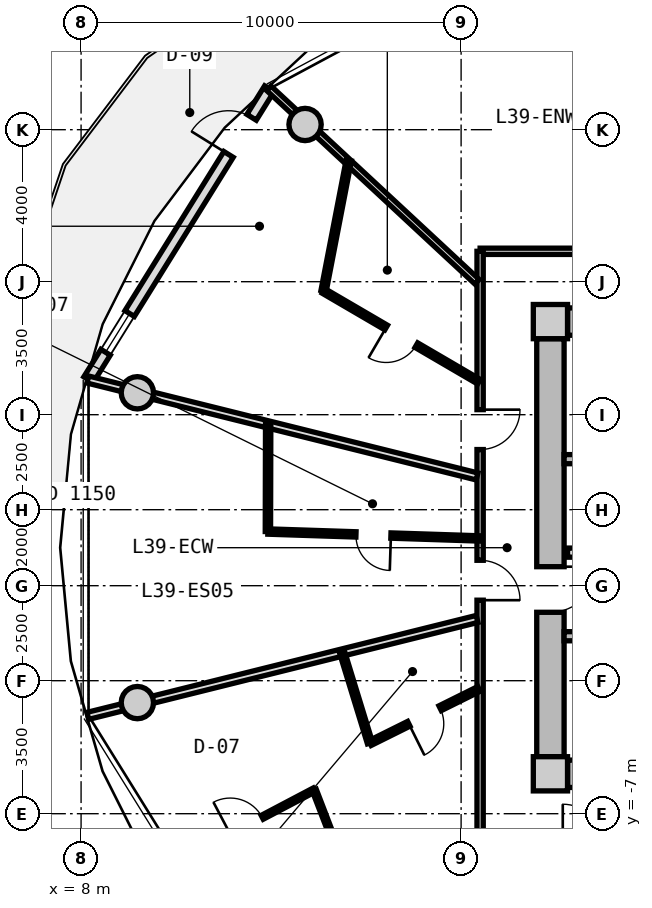
"""IFC4 building model, lengths in metres.
Left out: names, types, materials, properties, quantities, classifications, styles, units other than length and angle.
Written with IfcOpenShell. Run it as: python <this file> out.ifc"""

import sys

from ifc_helpers import new_model, si_unit, direction, frame, frame_2d, origin, origin_2d, place, context, subcontext, project, spatial, rectangle, circle, extrude, source, transform, mapped, element, fill, save


model = new_model("IFC4")
c1 = context("Model", 3, precision=1e-05, world=origin(), true_north=direction((0.0, 1.0)))
c2 = subcontext(c1, "Body", "Model", "MODEL_VIEW")
j1 = project(units=[si_unit("LENGTHUNIT", "METRE"), si_unit("PLANEANGLEUNIT", "RADIAN")], contexts=[c1])
p1 = place(None, origin())
s1 = spatial("IfcSite", under=j1, at=p1, CompositionType="ELEMENT")
p2 = place(p1, origin())
s2 = spatial("IfcBuilding", under=s1, at=p2, CompositionType="ELEMENT")
p3 = place(p2, frame((0.0, 0.0, 126.75)))
s3 = spatial("IfcBuildingStorey", under=s2, at=p3, CompositionType="ELEMENT", Elevation=126.75)
m1 = source(origin(), c2, "Body", "SweptSolid", [
    extrude(rectangle(XDim=0.9, YDim=0.9, at=origin_2d()), origin(), (0.0, 0.0, 1.0), 3.05),
])
for number, where, z_axis, x_axis in (
    (1, (20.35, -5.95, 0.0), (0.0, 0.0, 1.0), (1.0, 0.0, 0.0)),
    (2, (20.35, 5.95, 0.0), (0.0, 0.0, 1.0), (1.0, 0.0, 0.0)),
):
    element("IfcColumn", number, at=place(p3, frame(where, z_axis=z_axis, x_axis=x_axis)), inside=s3, PredefinedType="COLUMN", context=c2, shape_type="MappedRepresentation", body=[
        mapped(m1, transform((0.0, 0.0, 0.0), x_axis=(1.0, 0.0, 0.0), y_axis=(0.0, 1.0, 0.0), z_axis=(0.0, 0.0, 1.0), scale=1.0)),
    ])
m2 = source(origin(), c2, "Body", "SweptSolid", [
    extrude(rectangle(XDim=14.4, YDim=0.72, at=frame_2d((7.2, 0.0))), origin(), (0.0, 0.0, 1.0), 2.73),
])
for number, where, z_axis, x_axis in (
    (3, (20.8, 5.95, 0.0), (0.0, 0.0, 1.0), (1.0, 0.0, 0.0)),
    (4, (35.2, -5.95, 0.0), (0.0, 0.0, 1.0), (-1.0, 0.0, 0.0)),
):
    element("IfcWall", number, at=place(p3, frame(where, z_axis=z_axis, x_axis=x_axis)), inside=s3, PredefinedType="SHEAR", context=c2, shape_type="MappedRepresentation", body=[
        mapped(m2, transform((0.0, 0.0, 0.0), x_axis=(1.0, 0.0, 0.0), y_axis=(0.0, 1.0, 0.0), z_axis=(0.0, 0.0, 1.0), scale=1.0)),
    ])
m3 = source(origin(), c2, "Body", "SweptSolid", [
    extrude(rectangle(XDim=11.0, YDim=0.72, at=frame_2d((5.5, 0.0))), origin(), (0.0, 0.0, 1.0), 2.73),
])
p4 = place(p3, frame((20.35, -5.5, 0.0), z_axis=(0.0, 0.0, 1.0), x_axis=(0.0, 1.0, 0.0)))
e5 = element("IfcWall", 5, at=p4, inside=s3, PredefinedType="SHEAR", context=c2, shape_type="MappedRepresentation", body=[
    mapped(m3, transform((0.0, 0.0, 0.0), x_axis=(1.0, 0.0, 0.0), y_axis=(0.0, 1.0, 0.0), z_axis=(0.0, 0.0, 1.0), scale=1.0)),
])
p5 = place(p4, frame((3.8, 0.0, 0.0)))
e6 = element("IfcOpeningElement", 6, at=p5, cuts=e5, PredefinedType="OPENING", context=c2, shape_type="SweptSolid", body=[
    extrude(rectangle(XDim=1.2, YDim=2.15, at=frame_2d((0.6, 1.075))), frame((0.0, 0.37, 0.0), z_axis=(0.0, -1.0, 0.0), x_axis=(1.0, 0.0, 0.0)), (0.0, 0.0, 1.0), 0.74),
])
m4 = source(origin(), c2, "Body", "SweptSolid", [
    extrude(circle(Radius=0.425, at=origin_2d()), origin(), (0.0, 0.0, 1.0), 3.05),
])
for number, where, z_axis, x_axis in (
    (7, (13.894, 11.137, 0.0), (0.0, 0.0, 1.0), (1.0, 0.0, 0.0)),
    (8, (9.481, 4.076, 0.0), (0.0, 0.0, 1.0), (1.0, 0.0, 0.0)),
    (9, (9.481, -4.076, 0.0), (0.0, 0.0, 1.0), (1.0, 0.0, 0.0)),
):
    element("IfcColumn", number, at=place(p3, frame(where, z_axis=z_axis, x_axis=x_axis)), inside=s3, PredefinedType="COLUMN", context=c2, shape_type="MappedRepresentation", body=[
        mapped(m4, transform((0.0, 0.0, 0.0), x_axis=(1.0, 0.0, 0.0), y_axis=(0.0, 1.0, 0.0), z_axis=(0.0, 0.0, 1.0), scale=1.0)),
    ])
m5 = source(origin(), c2, "Body", "SweptSolid", [
    extrude(rectangle(XDim=9.014, YDim=0.29, at=frame_2d((4.507, 0.0))), origin(), (0.0, 0.0, 1.0), 2.73),
])
p6 = place(p3, frame((8.196, 4.421, 0.0), z_axis=(0.0, 0.0, 1.0), x_axis=(0.527732945084, 0.849410347637, 0.0)))
e10 = element("IfcWall", 10, at=p6, inside=s3, PredefinedType="SOLIDWALL", context=c2, shape_type="MappedRepresentation", body=[
    mapped(m5, transform((0.0, 0.0, 0.0), x_axis=(1.0, 0.0, 0.0), y_axis=(0.0, 1.0, 0.0), z_axis=(0.0, 0.0, 1.0), scale=1.0)),
])
p7 = place(p6, frame((6.98, 0.0, 0.0)))
e11 = element("IfcOpeningElement", 11, at=p7, cuts=e10, PredefinedType="OPENING", context=c2, shape_type="SweptSolid", body=[
    extrude(rectangle(XDim=1.15, YDim=2.25, at=frame_2d((0.575, 1.125))), frame((0.0, 0.155, 0.0), z_axis=(0.0, -1.0, 0.0), x_axis=(1.0, 0.0, 0.0)), (0.0, 0.0, 1.0), 0.31),
])
p8 = place(p6, frame((0.85, 0.0, 0.85)))
e12 = element("IfcOpeningElement", 12, at=p8, cuts=e10, PredefinedType="OPENING", context=c2, shape_type="SweptSolid", body=[
    extrude(rectangle(XDim=1.2, YDim=1.5, at=frame_2d((0.6, 0.75))), frame((0.0, 0.155, 0.0), z_axis=(0.0, -1.0, 0.0), x_axis=(1.0, 0.0, 0.0)), (0.0, 0.0, 1.0), 0.31),
])
m6 = source(origin(), c2, "Body", "SweptSolid", [
    extrude(rectangle(XDim=7.83, YDim=0.24, at=frame_2d((3.915, 0.0))), origin(), (0.0, 0.0, 1.0), 2.73),
])
p9 = place(p3, frame((20.71, 2.33, 0.0), z_axis=(0.0, 0.0, 1.0), x_axis=(1.0, 0.0, 0.0)))
e13 = element("IfcWall", 13, at=p9, inside=s3, PredefinedType="PARTITIONING", context=c2, shape_type="MappedRepresentation", body=[
    mapped(m6, transform((0.0, 0.0, 0.0), x_axis=(1.0, 0.0, 0.0), y_axis=(0.0, 1.0, 0.0), z_axis=(0.0, 0.0, 1.0), scale=1.0)),
])
p10 = place(p3, frame((20.71, -2.33, 0.0), z_axis=(0.0, 0.0, 1.0), x_axis=(1.0, 0.0, 0.0)))
e14 = element("IfcWall", 14, at=p10, inside=s3, PredefinedType="PARTITIONING", context=c2, shape_type="MappedRepresentation", body=[
    mapped(m6, transform((0.0, 0.0, 0.0), x_axis=(1.0, 0.0, 0.0), y_axis=(0.0, 1.0, 0.0), z_axis=(0.0, 0.0, 1.0), scale=1.0)),
])
p11 = place(p10, frame((0.95, 0.0, 0.0)))
e15 = element("IfcOpeningElement", 15, at=p11, cuts=e14, PredefinedType="OPENING", context=c2, shape_type="SweptSolid", body=[
    extrude(rectangle(XDim=1.1, YDim=2.15, at=frame_2d((0.55, 1.075))), frame((0.0, 0.13, 0.0), z_axis=(0.0, -1.0, 0.0), x_axis=(1.0, 0.0, 0.0)), (0.0, 0.0, 1.0), 0.26),
])
m7 = source(origin(), c2, "Body", "SweptSolid", [
    extrude(rectangle(XDim=7.62, YDim=0.24, at=frame_2d((3.81, 0.0))), origin(), (0.0, 0.0, 1.0), 2.715),
])
p12 = place(p3, frame((20.8, -0.13, 0.0), z_axis=(0.0, 0.0, 1.0), x_axis=(1.0, 0.0, 0.0)))
e16 = element("IfcWall", 16, at=p12, inside=s3, PredefinedType="PARTITIONING", context=c2, shape_type="MappedRepresentation", body=[
    mapped(m7, transform((0.0, 0.0, 0.0), x_axis=(1.0, 0.0, 0.0), y_axis=(0.0, 1.0, 0.0), z_axis=(0.0, 0.0, 1.0), scale=1.0)),
])
p13 = place(p12, frame((6.22, 0.0, 0.0)))
e17 = element("IfcOpeningElement", 17, at=p13, cuts=e16, PredefinedType="OPENING", context=c2, shape_type="SweptSolid", body=[
    extrude(rectangle(XDim=1.0, YDim=2.1, at=frame_2d((0.5, 1.05))), frame((0.0, 0.13, 0.0), z_axis=(0.0, -1.0, 0.0), x_axis=(1.0, 0.0, 0.0)), (0.0, 0.0, 1.0), 0.26),
])
p14 = place(p12, frame((2.4, 0.0, 0.0)))
e18 = element("IfcOpeningElement", 18, at=p14, cuts=e16, PredefinedType="OPENING", context=c2, shape_type="SweptSolid", body=[
    extrude(rectangle(XDim=1.0, YDim=2.1, at=frame_2d((0.5, 1.05))), frame((0.0, 0.13, 0.0), z_axis=(0.0, -1.0, 0.0), x_axis=(1.0, 0.0, 0.0)), (0.0, 0.0, 1.0), 0.26),
])
m8 = source(origin(), c2, "Body", "SweptSolid", [
    extrude(rectangle(XDim=8.6, YDim=0.165, at=frame_2d((4.3, 0.0))), origin(), (0.0, 0.0, 1.0), 2.715),
])
p15 = place(p3, frame((18.5, 7.8, 0.0), z_axis=(0.0, 0.0, 1.0), x_axis=(1.0, 0.0, 0.0)))
e19 = element("IfcWall", 19, at=p15, inside=s3, PredefinedType="PARTITIONING", context=c2, shape_type="MappedRepresentation", body=[
    mapped(m8, transform((0.0, 0.0, 0.0), x_axis=(1.0, 0.0, 0.0), y_axis=(0.0, 1.0, 0.0), z_axis=(0.0, 0.0, 1.0), scale=1.0)),
])
p16 = place(p15, frame((3.509, 0.0, 0.0)))
e20 = element("IfcOpeningElement", 20, at=p16, cuts=e19, PredefinedType="OPENING", context=c2, shape_type="SweptSolid", body=[
    extrude(rectangle(XDim=1.05, YDim=2.15, at=frame_2d((0.525, 1.075))), frame((0.0, 0.093, 0.0), z_axis=(0.0, -1.0, 0.0), x_axis=(1.0, 0.0, 0.0)), (0.0, 0.0, 1.0), 0.185),
])
m9 = source(origin(), c2, "Body", "SweptSolid", [
    extrude(rectangle(XDim=15.6, YDim=0.165, at=frame_2d((7.8, 0.0))), origin(), (0.0, 0.0, 1.0), 2.715),
])
p17 = place(p3, frame((18.5, -7.8, 0.0), z_axis=(0.0, 0.0, 1.0), x_axis=(0.0, 1.0, 0.0)))
e21 = element("IfcWall", 21, at=p17, inside=s3, PredefinedType="PARTITIONING", context=c2, shape_type="MappedRepresentation", body=[
    mapped(m9, transform((0.0, 0.0, 0.0), x_axis=(1.0, 0.0, 0.0), y_axis=(0.0, 1.0, 0.0), z_axis=(0.0, 0.0, 1.0), scale=1.0)),
])
p18 = place(p17, frame((10.383, 0.0, 0.0)))
e22 = element("IfcOpeningElement", 22, at=p18, cuts=e21, PredefinedType="OPENING", context=c2, shape_type="SweptSolid", body=[
    extrude(rectangle(XDim=1.05, YDim=2.15, at=frame_2d((0.525, 1.075))), frame((0.0, 0.093, 0.0), z_axis=(0.0, -1.0, 0.0), x_axis=(1.0, 0.0, 0.0)), (0.0, 0.0, 1.0), 0.185),
])
p19 = place(p17, frame((6.419, 0.0, 0.0)))
e23 = element("IfcOpeningElement", 23, at=p19, cuts=e21, PredefinedType="OPENING", context=c2, shape_type="SweptSolid", body=[
    extrude(rectangle(XDim=1.05, YDim=2.15, at=frame_2d((0.525, 1.075))), frame((0.0, 0.093, 0.0), z_axis=(0.0, -1.0, 0.0), x_axis=(1.0, 0.0, 0.0)), (0.0, 0.0, 1.0), 0.185),
])
m10 = source(origin(), c2, "Body", "SweptSolid", [
    extrude(rectangle(XDim=7.482, YDim=0.165, at=frame_2d((3.741, 0.0))), origin(), (0.0, 0.0, 1.0), 2.215),
])
p20 = place(p3, frame((18.42, 6.998, 0.0), z_axis=(0.0, 0.0, 1.0), x_axis=(-0.732508698043, 0.680757671489, 0.0)))
e24 = element("IfcWall", 24, at=p20, inside=s3, PredefinedType="PARTITIONING", context=c2, shape_type="MappedRepresentation", body=[
    mapped(m10, transform((0.0, 0.0, 0.0), x_axis=(1.0, 0.0, 0.0), y_axis=(0.0, 1.0, 0.0), z_axis=(0.0, 0.0, 1.0), scale=1.0)),
])
m11 = source(origin(), c2, "Body", "SweptSolid", [
    extrude(rectangle(XDim=10.556, YDim=0.19, at=frame_2d((5.278, 0.0))), origin(), (0.0, 0.0, 1.0), 2.215),
])
p21 = place(p3, frame((18.42, 1.875, 0.0), z_axis=(0.0, 0.0, 1.0), x_axis=(-0.970363857851, 0.241648470667, 0.0)))
e25 = element("IfcWall", 25, at=p21, inside=s3, PredefinedType="PARTITIONING", context=c2, shape_type="MappedRepresentation", body=[
    mapped(m11, transform((0.0, 0.0, 0.0), x_axis=(1.0, 0.0, 0.0), y_axis=(0.0, 1.0, 0.0), z_axis=(0.0, 0.0, 1.0), scale=1.0)),
])
m12 = source(origin(), c2, "Body", "SweptSolid", [
    extrude(rectangle(XDim=4.735, YDim=0.14, at=frame_2d((2.368, 0.0))), origin(), (0.0, 0.0, 1.0), 2.715),
])
p22 = place(p3, frame((18.47, 4.368, 0.0), z_axis=(0.0, 0.0, 1.0), x_axis=(-0.863537576642, 0.504284496814, 0.0)))
e26 = element("IfcWall", 26, at=p22, inside=s3, PredefinedType="PARTITIONING", context=c2, shape_type="MappedRepresentation", body=[
    mapped(m12, transform((0.0, 0.0, 0.0), x_axis=(1.0, 0.0, 0.0), y_axis=(0.0, 1.0, 0.0), z_axis=(0.0, 0.0, 1.0), scale=1.0)),
])
p23 = place(p22, frame((1.908, 0.0, 0.0)))
e27 = element("IfcOpeningElement", 27, at=p23, cuts=e26, PredefinedType="OPENING", context=c2, shape_type="SweptSolid", body=[
    extrude(rectangle(XDim=0.92, YDim=2.1, at=frame_2d((0.46, 1.05))), frame((0.0, 0.08, 0.0), z_axis=(0.0, -1.0, 0.0), x_axis=(1.0, 0.0, 0.0)), (0.0, 0.0, 1.0), 0.16),
])
m13 = source(origin(), c2, "Body", "SweptSolid", [
    extrude(rectangle(XDim=3.499, YDim=0.14, at=frame_2d((1.75, 0.0))), origin(), (0.0, 0.0, 1.0), 2.715),
])
p24 = place(p3, frame((14.381, 6.756, 0.0), z_axis=(0.0, 0.0, 1.0), x_axis=(0.18957713629, 0.981865830649, 0.0)))
e28 = element("IfcWall", 28, at=p24, inside=s3, PredefinedType="PARTITIONING", context=c2, shape_type="MappedRepresentation", body=[
    mapped(m13, transform((0.0, 0.0, 0.0), x_axis=(1.0, 0.0, 0.0), y_axis=(0.0, 1.0, 0.0), z_axis=(0.0, 0.0, 1.0), scale=1.0)),
])
p25 = place(p3, frame((18.42, -1.875, 0.0), z_axis=(0.0, 0.0, 1.0), x_axis=(-0.970363857851, -0.241648470667, 0.0)))
e29 = element("IfcWall", 29, at=p25, inside=s3, PredefinedType="PARTITIONING", context=c2, shape_type="MappedRepresentation", body=[
    mapped(m11, transform((0.0, 0.0, 0.0), x_axis=(1.0, 0.0, 0.0), y_axis=(0.0, 1.0, 0.0), z_axis=(0.0, 0.0, 1.0), scale=1.0)),
])
m14 = source(origin(), c2, "Body", "SweptSolid", [
    extrude(rectangle(XDim=5.557, YDim=0.14, at=frame_2d((2.778, 0.0))), origin(), (0.0, 0.0, 1.0), 2.715),
])
p26 = place(p3, frame((18.47, 0.244, 0.0), z_axis=(0.0, 0.0, 1.0), x_axis=(-0.999468495627, 0.03259948234, 0.0)))
e30 = element("IfcWall", 30, at=p26, inside=s3, PredefinedType="PARTITIONING", context=c2, shape_type="MappedRepresentation", body=[
    mapped(m14, transform((0.0, 0.0, 0.0), x_axis=(1.0, 0.0, 0.0), y_axis=(0.0, 1.0, 0.0), z_axis=(0.0, 0.0, 1.0), scale=1.0)),
])
p27 = place(p26, frame((2.318, 0.0, 0.0)))
e31 = element("IfcOpeningElement", 31, at=p27, cuts=e30, PredefinedType="OPENING", context=c2, shape_type="SweptSolid", body=[
    extrude(rectangle(XDim=0.92, YDim=2.1, at=frame_2d((0.46, 1.05))), frame((0.0, 0.08, 0.0), z_axis=(0.0, -1.0, 0.0), x_axis=(1.0, 0.0, 0.0)), (0.0, 0.0, 1.0), 0.16),
])
m15 = source(origin(), c2, "Body", "SweptSolid", [
    extrude(rectangle(XDim=2.837, YDim=0.14, at=frame_2d((1.418, 0.0))), origin(), (0.0, 0.0, 1.0), 2.715),
])
p28 = place(p3, frame((12.916, 0.425, 0.0), z_axis=(0.0, 0.0, 1.0), x_axis=(0.002409838945, 0.999997096334, 0.0)))
e32 = element("IfcWall", 32, at=p28, inside=s3, PredefinedType="PARTITIONING", context=c2, shape_type="MappedRepresentation", body=[
    mapped(m15, transform((0.0, 0.0, 0.0), x_axis=(1.0, 0.0, 0.0), y_axis=(0.0, 1.0, 0.0), z_axis=(0.0, 0.0, 1.0), scale=1.0)),
])
m16 = source(origin(), c2, "Body", "SweptSolid", [
    extrude(rectangle(XDim=3.203, YDim=0.14, at=frame_2d((1.601, 0.0))), origin(), (0.0, 0.0, 1.0), 2.715),
])
p29 = place(p3, frame((18.47, -3.717, 0.0), z_axis=(0.0, 0.0, 1.0), x_axis=(-0.895552551978, -0.444955758077, 0.0)))
e33 = element("IfcWall", 33, at=p29, inside=s3, PredefinedType="PARTITIONING", context=c2, shape_type="MappedRepresentation", body=[
    mapped(m16, transform((0.0, 0.0, 0.0), x_axis=(1.0, 0.0, 0.0), y_axis=(0.0, 1.0, 0.0), z_axis=(0.0, 0.0, 1.0), scale=1.0)),
])
p30 = place(p29, frame((1.141, 0.0, 0.0)))
e34 = element("IfcOpeningElement", 34, at=p30, cuts=e33, PredefinedType="OPENING", context=c2, shape_type="SweptSolid", body=[
    extrude(rectangle(XDim=0.92, YDim=2.1, at=frame_2d((0.46, 1.05))), frame((0.0, 0.08, 0.0), z_axis=(0.0, -1.0, 0.0), x_axis=(1.0, 0.0, 0.0)), (0.0, 0.0, 1.0), 0.16),
])
m17 = source(origin(), c2, "Body", "SweptSolid", [
    extrude(rectangle(XDim=2.478, YDim=0.14, at=frame_2d((1.239, 0.0))), origin(), (0.0, 0.0, 1.0), 2.715),
])
p31 = place(p3, frame((15.602, -5.142, 0.0), z_axis=(0.0, 0.0, 1.0), x_axis=(-0.293372504398, 0.955998207981, 0.0)))
e35 = element("IfcWall", 35, at=p31, inside=s3, PredefinedType="PARTITIONING", context=c2, shape_type="MappedRepresentation", body=[
    mapped(m17, transform((0.0, 0.0, 0.0), x_axis=(1.0, 0.0, 0.0), y_axis=(0.0, 1.0, 0.0), z_axis=(0.0, 0.0, 1.0), scale=1.0)),
])
m18 = source(origin(), c2, "Body", "SweptSolid", [
    extrude(rectangle(XDim=4.042, YDim=0.115, at=frame_2d((2.021, 0.0))), origin(), (0.0, 0.0, 1.0), 2.715),
])
p32 = place(p3, frame((14.134, -6.375, 0.0), z_axis=(0.0, 0.0, 1.0), x_axis=(-0.88476748851, -0.466032714812, 0.0)))
e36 = element("IfcWall", 36, at=p32, inside=s3, PredefinedType="PARTITIONING", context=c2, shape_type="MappedRepresentation", body=[
    mapped(m18, transform((0.0, 0.0, 0.0), x_axis=(1.0, 0.0, 0.0), y_axis=(0.0, 1.0, 0.0), z_axis=(0.0, 0.0, 1.0), scale=1.0)),
])
p33 = place(p32, frame((1.546, 0.0, 0.0)))
e37 = element("IfcOpeningElement", 37, at=p33, cuts=e36, PredefinedType="OPENING", context=c2, shape_type="SweptSolid", body=[
    extrude(rectangle(XDim=0.95, YDim=2.1, at=frame_2d((0.475, 1.05))), frame((0.0, 0.067, 0.0), z_axis=(0.0, -1.0, 0.0), x_axis=(1.0, 0.0, 0.0)), (0.0, 0.0, 1.0), 0.135),
])
m19 = source(origin(), c2, "Body", "SweptSolid", [
    extrude(rectangle(XDim=3.677, YDim=0.115, at=frame_2d((1.838, 0.0))), origin(), (0.0, 0.0, 1.0), 2.715),
])
p34 = place(p3, frame((14.134, -6.375, 0.0), z_axis=(0.0, 0.0, 1.0), x_axis=(0.359592980271, -0.933109258629, 0.0)))
e38 = element("IfcWall", 38, at=p34, inside=s3, PredefinedType="PARTITIONING", context=c2, shape_type="MappedRepresentation", body=[
    mapped(m19, transform((0.0, 0.0, 0.0), x_axis=(1.0, 0.0, 0.0), y_axis=(0.0, 1.0, 0.0), z_axis=(0.0, 0.0, 1.0), scale=1.0)),
])
m20 = source(origin(), c2, "Body", "SweptSolid", [
    extrude(rectangle(XDim=1.15, YDim=2.25, at=frame_2d((0.575, 1.125))), frame((0.0, 0.025, 0.0), z_axis=(0.0, -1.0, 0.0), x_axis=(1.0, 0.0, 0.0)), (0.0, 0.0, 1.0), 0.05),
])
p35 = place(p7, origin())
e39 = element("IfcDoor", 39, at=p35, inside=s3, OperationType="SINGLE_SWING_LEFT", PredefinedType="DOOR", context=c2, shape_type="MappedRepresentation", body=[
    mapped(m20, transform((0.0, 0.0, 0.0), x_axis=(1.0, 0.0, 0.0), y_axis=(0.0, 1.0, 0.0), z_axis=(0.0, 0.0, 1.0), scale=1.0)),
])
fill(e11, e39)
m21 = source(origin(), c2, "Body", "SweptSolid", [
    extrude(rectangle(XDim=1.2, YDim=1.5, at=frame_2d((0.6, 0.75))), frame((0.0, 0.03, 0.0), z_axis=(0.0, -1.0, 0.0), x_axis=(1.0, 0.0, 0.0)), (0.0, 0.0, 1.0), 0.06),
])
p36 = place(p8, origin())
e40 = element("IfcWindow", 40, at=p36, inside=s3, PartitioningType="SINGLE_PANEL", PredefinedType="WINDOW", context=c2, shape_type="MappedRepresentation", body=[
    mapped(m21, transform((0.0, 0.0, 0.0), x_axis=(1.0, 0.0, 0.0), y_axis=(0.0, 1.0, 0.0), z_axis=(0.0, 0.0, 1.0), scale=1.0)),
])
fill(e12, e40)
m22 = source(origin(), c2, "Body", "SweptSolid", [
    extrude(rectangle(XDim=1.2, YDim=2.15, at=frame_2d((0.6, 1.075))), frame((0.0, 0.025, 0.0), z_axis=(0.0, -1.0, 0.0), x_axis=(1.0, 0.0, 0.0)), (0.0, 0.0, 1.0), 0.05),
])
p37 = place(p5, frame((1.2, 0.0, 0.0), z_axis=(0.0, 0.0, 1.0), x_axis=(-1.0, 0.0, 0.0)))
e41 = element("IfcDoor", 41, at=p37, inside=s3, OperationType="SINGLE_SWING_LEFT", PredefinedType="DOOR", context=c2, shape_type="MappedRepresentation", body=[
    mapped(m22, transform((0.0, 0.0, 0.0), x_axis=(1.0, 0.0, 0.0), y_axis=(0.0, 1.0, 0.0), z_axis=(0.0, 0.0, 1.0), scale=1.0)),
])
fill(e6, e41)
m23 = source(origin(), c2, "Body", "SweptSolid", [
    extrude(rectangle(XDim=1.05, YDim=2.15, at=frame_2d((0.525, 1.075))), frame((0.0, 0.025, 0.0), z_axis=(0.0, -1.0, 0.0), x_axis=(1.0, 0.0, 0.0)), (0.0, 0.0, 1.0), 0.05),
])
p38 = place(p18, frame((1.05, 0.0, 0.0), z_axis=(0.0, 0.0, 1.0), x_axis=(-1.0, 0.0, 0.0)))
e42 = element("IfcDoor", 42, at=p38, inside=s3, OperationType="SINGLE_SWING_LEFT", PredefinedType="DOOR", context=c2, shape_type="MappedRepresentation", body=[
    mapped(m23, transform((0.0, 0.0, 0.0), x_axis=(1.0, 0.0, 0.0), y_axis=(0.0, 1.0, 0.0), z_axis=(0.0, 0.0, 1.0), scale=1.0)),
])
fill(e22, e42)
m24 = source(origin(), c2, "Body", "SweptSolid", [
    extrude(rectangle(XDim=0.92, YDim=2.1, at=frame_2d((0.46, 1.05))), frame((0.0, 0.025, 0.0), z_axis=(0.0, -1.0, 0.0), x_axis=(1.0, 0.0, 0.0)), (0.0, 0.0, 1.0), 0.05),
])
p39 = place(p23, origin())
e43 = element("IfcDoor", 43, at=p39, inside=s3, OperationType="SINGLE_SWING_RIGHT", PredefinedType="DOOR", context=c2, shape_type="MappedRepresentation", body=[
    mapped(m24, transform((0.0, 0.0, 0.0), x_axis=(1.0, 0.0, 0.0), y_axis=(0.0, 1.0, 0.0), z_axis=(0.0, 0.0, 1.0), scale=1.0)),
])
fill(e27, e43)
p40 = place(p19, frame((1.05, 0.0, 0.0), z_axis=(0.0, 0.0, 1.0), x_axis=(-1.0, 0.0, 0.0)))
e44 = element("IfcDoor", 44, at=p40, inside=s3, OperationType="SINGLE_SWING_RIGHT", PredefinedType="DOOR", context=c2, shape_type="MappedRepresentation", body=[
    mapped(m23, transform((0.0, 0.0, 0.0), x_axis=(1.0, 0.0, 0.0), y_axis=(0.0, 1.0, 0.0), z_axis=(0.0, 0.0, 1.0), scale=1.0)),
])
fill(e23, e44)
p41 = place(p27, origin())
e45 = element("IfcDoor", 45, at=p41, inside=s3, OperationType="SINGLE_SWING_LEFT", PredefinedType="DOOR", context=c2, shape_type="MappedRepresentation", body=[
    mapped(m24, transform((0.0, 0.0, 0.0), x_axis=(1.0, 0.0, 0.0), y_axis=(0.0, 1.0, 0.0), z_axis=(0.0, 0.0, 1.0), scale=1.0)),
])
fill(e31, e45)
p42 = place(p30, origin())
e46 = element("IfcDoor", 46, at=p42, inside=s3, OperationType="SINGLE_SWING_RIGHT", PredefinedType="DOOR", context=c2, shape_type="MappedRepresentation", body=[
    mapped(m24, transform((0.0, 0.0, 0.0), x_axis=(1.0, 0.0, 0.0), y_axis=(0.0, 1.0, 0.0), z_axis=(0.0, 0.0, 1.0), scale=1.0)),
])
fill(e34, e46)
m25 = source(origin(), c2, "Body", "SweptSolid", [
    extrude(rectangle(XDim=0.95, YDim=2.1, at=frame_2d((0.475, 1.05))), frame((0.0, 0.025, 0.0), z_axis=(0.0, -1.0, 0.0), x_axis=(1.0, 0.0, 0.0)), (0.0, 0.0, 1.0), 0.05),
])
p43 = place(p33, frame((0.95, 0.0, 0.0), z_axis=(0.0, 0.0, 1.0), x_axis=(-1.0, 0.0, 0.0)))
e47 = element("IfcDoor", 47, at=p43, inside=s3, OperationType="SINGLE_SWING_LEFT", PredefinedType="DOOR", context=c2, shape_type="MappedRepresentation", body=[
    mapped(m25, transform((0.0, 0.0, 0.0), x_axis=(1.0, 0.0, 0.0), y_axis=(0.0, 1.0, 0.0), z_axis=(0.0, 0.0, 1.0), scale=1.0)),
])
fill(e37, e47)
save(model, sys.argv[1])
